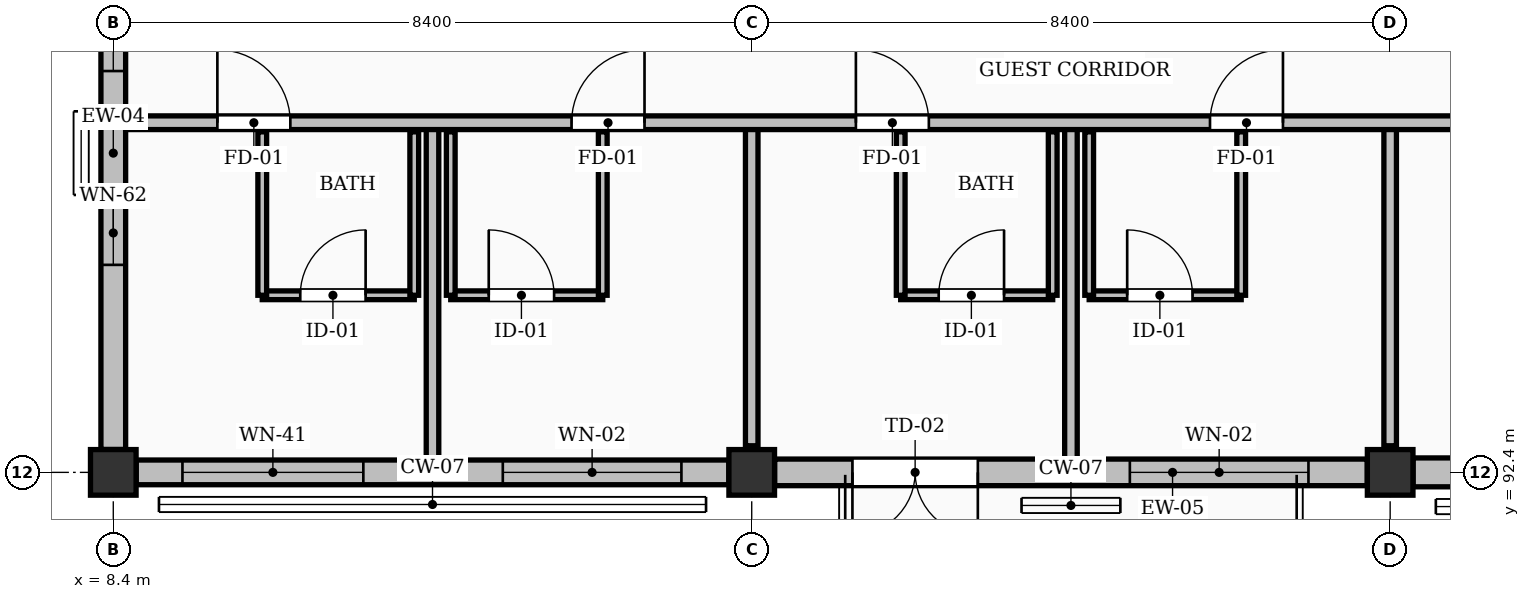
"""IFC4 building model, lengths in metres.
Left out: names, types, materials, properties, quantities, classifications, styles, units other than length and angle.
Written with IfcOpenShell. Run it as: python <this file> out.ifc"""

import sys

from ifc_helpers import new_model, si_unit, direction, frame, frame_2d, origin, origin_2d, place, context, subcontext, project, spatial, rectangle, extrude, element, fill, save


model = new_model("IFC4")
c1 = context("Model", 3, precision=1e-05, world=origin(), true_north=direction((0.0, 1.0)))
c2 = subcontext(c1, "Body", "Model", "MODEL_VIEW")
j1 = project(units=[si_unit("LENGTHUNIT", "METRE"), si_unit("PLANEANGLEUNIT", "RADIAN")], contexts=[c1])
p1 = place(None, origin())
s1 = spatial("IfcSite", under=j1, at=p1, CompositionType="ELEMENT")
p2 = place(p1, origin())
s2 = spatial("IfcBuilding", under=s1, at=p2, CompositionType="ELEMENT")
p3 = place(p2, frame((0.0, 0.0, 31.92)))
s3 = spatial("IfcBuildingStorey", under=s2, at=p3, CompositionType="ELEMENT", Elevation=31.92)
for number, where, z_axis, x_axis in (
    (1, (8.4, 92.4, 0.0), (0.0, 0.0, 1.0), (1.0, 0.0, 0.0)),
    (2, (16.8, 92.4, 0.0), (0.0, 0.0, 1.0), (1.0, 0.0, 0.0)),
    (3, (25.2, 92.4, 0.0), (0.0, 0.0, 1.0), (1.0, 0.0, 0.0)),
):
    element("IfcColumn", number, at=place(p3, frame(where, z_axis=z_axis, x_axis=x_axis)), inside=s3, PredefinedType="COLUMN", context=c2, shape_type="SweptSolid", body=[
        extrude(rectangle(XDim=0.6, YDim=0.6, at=origin_2d()), origin(), (0.0, 0.0, 1.0), 3.36),
    ])
p4 = place(p3, frame((8.701, 92.4, 0.0), z_axis=(0.0, 0.0, 1.0), x_axis=(1.0, 0.0, 0.0)))
e4 = element("IfcWall", 4, at=p4, inside=s3, PredefinedType="SOLIDWALL", context=c2, shape_type="SweptSolid", body=[
    extrude(rectangle(XDim=7.798, YDim=0.325, at=frame_2d((3.899, 0.0))), origin(), (0.0, 0.0, 1.0), 2.474),
])
p5 = place(p4, frame((0.609, 0.0, 0.25)))
e5 = element("IfcOpeningElement", 5, at=p5, cuts=e4, PredefinedType="OPENING", context=c2, shape_type="SweptSolid", body=[
    extrude(rectangle(XDim=2.38, YDim=2.0, at=frame_2d((1.19, 1.0))), frame((0.0, 0.172, 0.0), z_axis=(0.0, -1.0, 0.0), x_axis=(1.0, 0.0, 0.0)), (0.0, 0.0, 1.0), 0.345),
])
p6 = place(p4, frame((4.824, 0.0, 0.25)))
e6 = element("IfcOpeningElement", 6, at=p6, cuts=e4, PredefinedType="OPENING", context=c2, shape_type="SweptSolid", body=[
    extrude(rectangle(XDim=2.35, YDim=1.85, at=frame_2d((1.175, 0.925))), frame((0.0, 0.172, 0.0), z_axis=(0.0, -1.0, 0.0), x_axis=(1.0, 0.0, 0.0)), (0.0, 0.0, 1.0), 0.345),
])
p7 = place(p3, frame((17.101, 92.4, 0.0), z_axis=(0.0, 0.0, 1.0), x_axis=(1.0, 0.0, 0.0)))
e7 = element("IfcWall", 7, at=p7, inside=s3, PredefinedType="SOLIDWALL", context=c2, shape_type="SweptSolid", body=[
    extrude(rectangle(XDim=7.798, YDim=0.35, at=frame_2d((3.899, 0.0))), origin(), (0.0, 0.0, 1.0), 2.474),
])
p8 = place(p7, frame((1.024, 0.0, 0.0)))
e8 = element("IfcOpeningElement", 8, at=p8, cuts=e7, PredefinedType="OPENING", context=c2, shape_type="SweptSolid", body=[
    extrude(rectangle(XDim=1.65, YDim=2.08, at=frame_2d((0.825, 1.04))), frame((0.0, 0.185, 0.0), z_axis=(0.0, -1.0, 0.0), x_axis=(1.0, 0.0, 0.0)), (0.0, 0.0, 1.0), 0.37),
])
p9 = place(p7, frame((4.674, 0.0, 0.25)))
e9 = element("IfcOpeningElement", 9, at=p9, cuts=e7, PredefinedType="OPENING", context=c2, shape_type="SweptSolid", body=[
    extrude(rectangle(XDim=2.35, YDim=1.85, at=frame_2d((1.175, 0.925))), frame((0.0, 0.185, 0.0), z_axis=(0.0, -1.0, 0.0), x_axis=(1.0, 0.0, 0.0)), (0.0, 0.0, 1.0), 0.37),
])
p10 = place(p3, frame((25.501, 92.4, 0.0), z_axis=(0.0, 0.0, 1.0), x_axis=(1.0, 0.0, 0.0)))
e10 = element("IfcWall", 10, at=p10, inside=s3, PredefinedType="SOLIDWALL", context=c2, shape_type="SweptSolid", body=[
    extrude(rectangle(XDim=7.798, YDim=0.38, at=frame_2d((3.899, 0.0))), origin(), (0.0, 0.0, 1.0), 2.474),
])
p11 = place(p10, frame((0.674, 0.0, 0.25)))
e11 = element("IfcOpeningElement", 11, at=p11, cuts=e10, PredefinedType="OPENING", context=c2, shape_type="SweptSolid", body=[
    extrude(rectangle(XDim=2.25, YDim=1.95, at=frame_2d((1.125, 0.975))), frame((0.0, 0.2, 0.0), z_axis=(0.0, -1.0, 0.0), x_axis=(1.0, 0.0, 0.0)), (0.0, 0.0, 1.0), 0.4),
])
p12 = place(p10, frame((4.874, 0.0, 0.25)))
e12 = element("IfcOpeningElement", 12, at=p12, cuts=e10, PredefinedType="OPENING", context=c2, shape_type="SweptSolid", body=[
    extrude(rectangle(XDim=2.25, YDim=2.05, at=frame_2d((1.125, 1.025))), frame((0.0, 0.2, 0.0), z_axis=(0.0, -1.0, 0.0), x_axis=(1.0, 0.0, 0.0)), (0.0, 0.0, 1.0), 0.4),
])
p13 = place(p3, frame((8.4, 92.701, 0.0), z_axis=(0.0, 0.0, 1.0), x_axis=(0.0, 1.0, 0.0)))
e13 = element("IfcWall", 13, at=p13, inside=s3, PredefinedType="SOLIDWALL", context=c2, shape_type="SweptSolid", body=[
    extrude(rectangle(XDim=7.798, YDim=0.325, at=frame_2d((3.899, 0.0))), origin(), (0.0, 0.0, 1.0), 2.474),
])
p14 = place(p13, frame((2.429, 0.0, 0.3)))
e14 = element("IfcOpeningElement", 14, at=p14, cuts=e13, PredefinedType="OPENING", context=c2, shape_type="SweptSolid", body=[
    extrude(rectangle(XDim=0.84, YDim=1.75, at=frame_2d((0.42, 0.875))), frame((0.0, 0.172, 0.0), z_axis=(0.0, -1.0, 0.0), x_axis=(1.0, 0.0, 0.0)), (0.0, 0.0, 1.0), 0.345),
])
p15 = place(p13, frame((4.979, 0.0, 0.3)))
e15 = element("IfcOpeningElement", 15, at=p15, cuts=e13, PredefinedType="OPENING", context=c2, shape_type="SweptSolid", body=[
    extrude(rectangle(XDim=0.84, YDim=1.75, at=frame_2d((0.42, 0.875))), frame((0.0, 0.172, 0.0), z_axis=(0.0, -1.0, 0.0), x_axis=(1.0, 0.0, 0.0)), (0.0, 0.0, 1.0), 0.345),
])
p16 = place(p3, frame((10.36, 94.73, 0.0), z_axis=(0.0, 0.0, 1.0), x_axis=(1.0, 0.0, 0.0)))
e16 = element("IfcWall", 16, at=p16, inside=s3, PredefinedType="PARTITIONING", context=c2, shape_type="SweptSolid", body=[
    extrude(rectangle(XDim=2.0, YDim=0.115, at=frame_2d((1.0, 0.0))), origin(), (0.0, 0.0, 1.0), 3.1),
])
p17 = place(p16, frame((0.5, 0.0, 0.0)))
e17 = element("IfcOpeningElement", 17, at=p17, cuts=e16, PredefinedType="OPENING", context=c2, shape_type="SweptSolid", body=[
    extrude(rectangle(XDim=0.86, YDim=2.05, at=frame_2d((0.43, 1.025))), frame((0.0, 0.067, 0.0), z_axis=(0.0, -1.0, 0.0), x_axis=(1.0, 0.0, 0.0)), (0.0, 0.0, 1.0), 0.135),
])
p18 = place(p3, frame((10.36, 94.73, 0.0), z_axis=(0.0, 0.0, 1.0), x_axis=(0.0, 1.0, 0.0)))
e18 = element("IfcWall", 18, at=p18, inside=s3, PredefinedType="PARTITIONING", context=c2, shape_type="SweptSolid", body=[
    extrude(rectangle(XDim=2.15, YDim=0.115, at=frame_2d((1.075, 0.0))), origin(), (0.0, 0.0, 1.0), 2.622),
])
p19 = place(p3, frame((12.36, 94.73, 0.0), z_axis=(0.0, 0.0, 1.0), x_axis=(0.0, 1.0, 0.0)))
e19 = element("IfcWall", 19, at=p19, inside=s3, PredefinedType="PARTITIONING", context=c2, shape_type="SweptSolid", body=[
    extrude(rectangle(XDim=2.15, YDim=0.115, at=frame_2d((1.075, 0.0))), origin(), (0.0, 0.0, 1.0), 3.1),
])
p20 = place(p3, frame((12.84, 94.73, 0.0), z_axis=(0.0, 0.0, 1.0), x_axis=(1.0, 0.0, 0.0)))
e20 = element("IfcWall", 20, at=p20, inside=s3, PredefinedType="PARTITIONING", context=c2, shape_type="SweptSolid", body=[
    extrude(rectangle(XDim=2.0, YDim=0.115, at=frame_2d((1.0, 0.0))), origin(), (0.0, 0.0, 1.0), 3.1),
])
p21 = place(p20, frame((0.5, 0.0, 0.0)))
e21 = element("IfcOpeningElement", 21, at=p21, cuts=e20, PredefinedType="OPENING", context=c2, shape_type="SweptSolid", body=[
    extrude(rectangle(XDim=0.86, YDim=2.05, at=frame_2d((0.43, 1.025))), frame((0.0, 0.067, 0.0), z_axis=(0.0, -1.0, 0.0), x_axis=(1.0, 0.0, 0.0)), (0.0, 0.0, 1.0), 0.135),
])
p22 = place(p3, frame((12.84, 94.73, 0.0), z_axis=(0.0, 0.0, 1.0), x_axis=(0.0, 1.0, 0.0)))
e22 = element("IfcWall", 22, at=p22, inside=s3, PredefinedType="PARTITIONING", context=c2, shape_type="SweptSolid", body=[
    extrude(rectangle(XDim=2.15, YDim=0.115, at=frame_2d((1.075, 0.0))), origin(), (0.0, 0.0, 1.0), 3.1),
])
p23 = place(p3, frame((14.84, 94.73, 0.0), z_axis=(0.0, 0.0, 1.0), x_axis=(0.0, 1.0, 0.0)))
e23 = element("IfcWall", 23, at=p23, inside=s3, PredefinedType="PARTITIONING", context=c2, shape_type="SweptSolid", body=[
    extrude(rectangle(XDim=2.15, YDim=0.115, at=frame_2d((1.075, 0.0))), origin(), (0.0, 0.0, 1.0), 2.622),
])
p24 = place(p3, frame((12.6, 92.562, 0.0), z_axis=(0.0, 0.0, 1.0), x_axis=(0.0, 1.0, 0.0)))
e24 = element("IfcWall", 24, at=p24, inside=s3, PredefinedType="PARTITIONING", context=c2, shape_type="SweptSolid", body=[
    extrude(rectangle(XDim=4.438, YDim=0.165, at=frame_2d((2.219, 0.0))), origin(), (0.0, 0.0, 1.0), 3.1),
])
p25 = place(p3, frame((18.76, 94.73, 0.0), z_axis=(0.0, 0.0, 1.0), x_axis=(1.0, 0.0, 0.0)))
e25 = element("IfcWall", 25, at=p25, inside=s3, PredefinedType="PARTITIONING", context=c2, shape_type="SweptSolid", body=[
    extrude(rectangle(XDim=2.0, YDim=0.115, at=frame_2d((1.0, 0.0))), origin(), (0.0, 0.0, 1.0), 3.1),
])
p26 = place(p25, frame((0.5, 0.0, 0.0)))
e26 = element("IfcOpeningElement", 26, at=p26, cuts=e25, PredefinedType="OPENING", context=c2, shape_type="SweptSolid", body=[
    extrude(rectangle(XDim=0.86, YDim=2.05, at=frame_2d((0.43, 1.025))), frame((0.0, 0.067, 0.0), z_axis=(0.0, -1.0, 0.0), x_axis=(1.0, 0.0, 0.0)), (0.0, 0.0, 1.0), 0.135),
])
for number, where, z_axis, x_axis in (
    (27, (18.76, 94.73, 0.0), (0.0, 0.0, 1.0), (0.0, 1.0, 0.0)),
    (28, (20.76, 94.73, 0.0), (0.0, 0.0, 1.0), (0.0, 1.0, 0.0)),
):
    element("IfcWall", number, at=place(p3, frame(where, z_axis=z_axis, x_axis=x_axis)), inside=s3, PredefinedType="PARTITIONING", context=c2, shape_type="SweptSolid", body=[
        extrude(rectangle(XDim=2.15, YDim=0.115, at=frame_2d((1.075, 0.0))), origin(), (0.0, 0.0, 1.0), 3.1),
    ])
p27 = place(p3, frame((21.24, 94.73, 0.0), z_axis=(0.0, 0.0, 1.0), x_axis=(1.0, 0.0, 0.0)))
e29 = element("IfcWall", 29, at=p27, inside=s3, PredefinedType="PARTITIONING", context=c2, shape_type="SweptSolid", body=[
    extrude(rectangle(XDim=2.0, YDim=0.115, at=frame_2d((1.0, 0.0))), origin(), (0.0, 0.0, 1.0), 3.1),
])
p28 = place(p27, frame((0.5, 0.0, 0.0)))
e30 = element("IfcOpeningElement", 30, at=p28, cuts=e29, PredefinedType="OPENING", context=c2, shape_type="SweptSolid", body=[
    extrude(rectangle(XDim=0.86, YDim=2.05, at=frame_2d((0.43, 1.025))), frame((0.0, 0.067, 0.0), z_axis=(0.0, -1.0, 0.0), x_axis=(1.0, 0.0, 0.0)), (0.0, 0.0, 1.0), 0.135),
])
for number, where, z_axis, x_axis in (
    (31, (21.24, 94.73, 0.0), (0.0, 0.0, 1.0), (0.0, 1.0, 0.0)),
    (32, (23.24, 94.73, 0.0), (0.0, 0.0, 1.0), (0.0, 1.0, 0.0)),
):
    element("IfcWall", number, at=place(p3, frame(where, z_axis=z_axis, x_axis=x_axis)), inside=s3, PredefinedType="PARTITIONING", context=c2, shape_type="SweptSolid", body=[
        extrude(rectangle(XDim=2.15, YDim=0.115, at=frame_2d((1.075, 0.0))), origin(), (0.0, 0.0, 1.0), 3.1),
    ])
p29 = place(p3, frame((21.0, 92.575, 0.0), z_axis=(0.0, 0.0, 1.0), x_axis=(0.0, 1.0, 0.0)))
e33 = element("IfcWall", 33, at=p29, inside=s3, PredefinedType="PARTITIONING", context=c2, shape_type="SweptSolid", body=[
    extrude(rectangle(XDim=4.425, YDim=0.165, at=frame_2d((2.212, 0.0))), origin(), (0.0, 0.0, 1.0), 3.1),
])
for number, where, z_axis, x_axis in (
    (34, (16.8, 92.75, 0.0), (0.0, 0.0, 1.0), (0.0, 1.0, 0.0)),
    (35, (25.2, 92.75, 0.0), (0.0, 0.0, 1.0), (0.0, 1.0, 0.0)),
):
    element("IfcWall", number, at=place(p3, frame(where, z_axis=z_axis, x_axis=x_axis)), inside=s3, PredefinedType="PARTITIONING", context=c2, shape_type="SweptSolid", body=[
        extrude(rectangle(XDim=4.25, YDim=0.165, at=frame_2d((2.125, 0.0))), origin(), (0.0, 0.0, 1.0), 2.435),
    ])
p30 = place(p3, frame((8.562, 97.0, 0.0), z_axis=(0.0, 0.0, 1.0), x_axis=(1.0, 0.0, 0.0)))
e36 = element("IfcWall", 36, at=p30, inside=s3, PredefinedType="PARTITIONING", context=c2, shape_type="SweptSolid", body=[
    extrude(rectangle(XDim=41.837, YDim=0.18, at=frame_2d((20.919, 0.0))), origin(), (0.0, 0.0, 1.0), 3.1),
])
p31 = place(p30, frame((1.207, 0.0, 0.0)))
e37 = element("IfcOpeningElement", 37, at=p31, cuts=e36, PredefinedType="OPENING", context=c2, shape_type="SweptSolid", body=[
    extrude(rectangle(XDim=0.96, YDim=2.15, at=frame_2d((0.48, 1.075))), frame((0.0, 0.1, 0.0), z_axis=(0.0, -1.0, 0.0), x_axis=(1.0, 0.0, 0.0)), (0.0, 0.0, 1.0), 0.2),
])
p32 = place(p30, frame((5.867, 0.0, 0.0)))
e38 = element("IfcOpeningElement", 38, at=p32, cuts=e36, PredefinedType="OPENING", context=c2, shape_type="SweptSolid", body=[
    extrude(rectangle(XDim=0.96, YDim=2.15, at=frame_2d((0.48, 1.075))), frame((0.0, 0.1, 0.0), z_axis=(0.0, -1.0, 0.0), x_axis=(1.0, 0.0, 0.0)), (0.0, 0.0, 1.0), 0.2),
])
p33 = place(p30, frame((9.608, 0.0, 0.0)))
e39 = element("IfcOpeningElement", 39, at=p33, cuts=e36, PredefinedType="OPENING", context=c2, shape_type="SweptSolid", body=[
    extrude(rectangle(XDim=0.96, YDim=2.15, at=frame_2d((0.48, 1.075))), frame((0.0, 0.1, 0.0), z_axis=(0.0, -1.0, 0.0), x_axis=(1.0, 0.0, 0.0)), (0.0, 0.0, 1.0), 0.2),
])
p34 = place(p30, frame((14.267, 0.0, 0.0)))
e40 = element("IfcOpeningElement", 40, at=p34, cuts=e36, PredefinedType="OPENING", context=c2, shape_type="SweptSolid", body=[
    extrude(rectangle(XDim=0.96, YDim=2.15, at=frame_2d((0.48, 1.075))), frame((0.0, 0.1, 0.0), z_axis=(0.0, -1.0, 0.0), x_axis=(1.0, 0.0, 0.0)), (0.0, 0.0, 1.0), 0.2),
])
p35 = place(p30, frame((18.008, 0.0, 0.0)))
e41 = element("IfcOpeningElement", 41, at=p35, cuts=e36, PredefinedType="OPENING", context=c2, shape_type="SweptSolid", body=[
    extrude(rectangle(XDim=0.96, YDim=2.15, at=frame_2d((0.48, 1.075))), frame((0.0, 0.1, 0.0), z_axis=(0.0, -1.0, 0.0), x_axis=(1.0, 0.0, 0.0)), (0.0, 0.0, 1.0), 0.2),
])
p36 = place(p30, frame((22.668, 0.0, 0.0)))
e42 = element("IfcOpeningElement", 42, at=p36, cuts=e36, PredefinedType="OPENING", context=c2, shape_type="SweptSolid", body=[
    extrude(rectangle(XDim=0.96, YDim=2.15, at=frame_2d((0.48, 1.075))), frame((0.0, 0.1, 0.0), z_axis=(0.0, -1.0, 0.0), x_axis=(1.0, 0.0, 0.0)), (0.0, 0.0, 1.0), 0.2),
])
p37 = place(p30, frame((26.407, 0.0, 0.0)))
e43 = element("IfcOpeningElement", 43, at=p37, cuts=e36, PredefinedType="OPENING", context=c2, shape_type="SweptSolid", body=[
    extrude(rectangle(XDim=0.96, YDim=2.15, at=frame_2d((0.48, 1.075))), frame((0.0, 0.1, 0.0), z_axis=(0.0, -1.0, 0.0), x_axis=(1.0, 0.0, 0.0)), (0.0, 0.0, 1.0), 0.2),
])
p38 = place(p30, frame((31.068, 0.0, 0.0)))
e44 = element("IfcOpeningElement", 44, at=p38, cuts=e36, PredefinedType="OPENING", context=c2, shape_type="SweptSolid", body=[
    extrude(rectangle(XDim=0.96, YDim=2.15, at=frame_2d((0.48, 1.075))), frame((0.0, 0.1, 0.0), z_axis=(0.0, -1.0, 0.0), x_axis=(1.0, 0.0, 0.0)), (0.0, 0.0, 1.0), 0.2),
])
p39 = place(p30, frame((36.837, 0.0, 0.0)))
e45 = element("IfcOpeningElement", 45, at=p39, cuts=e36, PredefinedType="OPENING", context=c2, shape_type="SweptSolid", body=[
    extrude(rectangle(XDim=1.62, YDim=2.2, at=frame_2d((0.81, 1.1))), frame((0.0, 0.1, 0.0), z_axis=(0.0, -1.0, 0.0), x_axis=(1.0, 0.0, 0.0)), (0.0, 0.0, 1.0), 0.2),
])
p40 = place(p5, origin())
e46 = element("IfcWindow", 46, at=p40, inside=s3, PartitioningType="DOUBLE_PANEL_VERTICAL", PredefinedType="WINDOW", context=c2, shape_type="SweptSolid", body=[
    extrude(rectangle(XDim=2.38, YDim=2.0, at=frame_2d((1.19, 1.0))), frame((0.0, 0.03, 0.0), z_axis=(0.0, -1.0, 0.0), x_axis=(1.0, 0.0, 0.0)), (0.0, 0.0, 1.0), 0.06),
])
fill(e5, e46)
p41 = place(p6, origin())
e47 = element("IfcWindow", 47, at=p41, inside=s3, PartitioningType="DOUBLE_PANEL_VERTICAL", PredefinedType="WINDOW", context=c2, shape_type="SweptSolid", body=[
    extrude(rectangle(XDim=2.35, YDim=1.85, at=frame_2d((1.175, 0.925))), frame((0.0, 0.03, 0.0), z_axis=(0.0, -1.0, 0.0), x_axis=(1.0, 0.0, 0.0)), (0.0, 0.0, 1.0), 0.06),
])
fill(e6, e47)
p42 = place(p8, frame((1.65, 0.0, 0.0), z_axis=(0.0, 0.0, 1.0), x_axis=(-1.0, 0.0, 0.0)))
e48 = element("IfcDoor", 48, at=p42, inside=s3, OperationType="DOUBLE_DOOR_SINGLE_SWING", PredefinedType="DOOR", context=c2, shape_type="SweptSolid", body=[
    extrude(rectangle(XDim=1.65, YDim=2.08, at=frame_2d((0.825, 1.04))), frame((0.0, 0.025, 0.0), z_axis=(0.0, -1.0, 0.0), x_axis=(1.0, 0.0, 0.0)), (0.0, 0.0, 1.0), 0.05),
])
fill(e8, e48)
p43 = place(p9, origin())
e49 = element("IfcWindow", 49, at=p43, inside=s3, PartitioningType="DOUBLE_PANEL_VERTICAL", PredefinedType="WINDOW", context=c2, shape_type="SweptSolid", body=[
    extrude(rectangle(XDim=2.35, YDim=1.85, at=frame_2d((1.175, 0.925))), frame((0.0, 0.03, 0.0), z_axis=(0.0, -1.0, 0.0), x_axis=(1.0, 0.0, 0.0)), (0.0, 0.0, 1.0), 0.06),
])
fill(e9, e49)
p44 = place(p14, origin())
e50 = element("IfcWindow", 50, at=p44, inside=s3, PartitioningType="SINGLE_PANEL", PredefinedType="WINDOW", context=c2, shape_type="SweptSolid", body=[
    extrude(rectangle(XDim=0.84, YDim=1.75, at=frame_2d((0.42, 0.875))), frame((0.0, 0.03, 0.0), z_axis=(0.0, -1.0, 0.0), x_axis=(1.0, 0.0, 0.0)), (0.0, 0.0, 1.0), 0.06),
])
fill(e14, e50)
p45 = place(p15, origin())
e51 = element("IfcWindow", 51, at=p45, inside=s3, PartitioningType="SINGLE_PANEL", PredefinedType="WINDOW", context=c2, shape_type="SweptSolid", body=[
    extrude(rectangle(XDim=0.84, YDim=1.75, at=frame_2d((0.42, 0.875))), frame((0.0, 0.03, 0.0), z_axis=(0.0, -1.0, 0.0), x_axis=(1.0, 0.0, 0.0)), (0.0, 0.0, 1.0), 0.06),
])
fill(e15, e51)
p46 = place(p17, origin())
e52 = element("IfcDoor", 52, at=p46, inside=s3, OperationType="SINGLE_SWING_RIGHT", PredefinedType="DOOR", context=c2, shape_type="SweptSolid", body=[
    extrude(rectangle(XDim=0.86, YDim=2.05, at=frame_2d((0.43, 1.025))), frame((0.0, 0.025, 0.0), z_axis=(0.0, -1.0, 0.0), x_axis=(1.0, 0.0, 0.0)), (0.0, 0.0, 1.0), 0.05),
])
fill(e17, e52)
p47 = place(p21, origin())
e53 = element("IfcDoor", 53, at=p47, inside=s3, OperationType="SINGLE_SWING_LEFT", PredefinedType="DOOR", context=c2, shape_type="SweptSolid", body=[
    extrude(rectangle(XDim=0.86, YDim=2.05, at=frame_2d((0.43, 1.025))), frame((0.0, 0.025, 0.0), z_axis=(0.0, -1.0, 0.0), x_axis=(1.0, 0.0, 0.0)), (0.0, 0.0, 1.0), 0.05),
])
fill(e21, e53)
p48 = place(p26, origin())
e54 = element("IfcDoor", 54, at=p48, inside=s3, OperationType="SINGLE_SWING_RIGHT", PredefinedType="DOOR", context=c2, shape_type="SweptSolid", body=[
    extrude(rectangle(XDim=0.86, YDim=2.05, at=frame_2d((0.43, 1.025))), frame((0.0, 0.025, 0.0), z_axis=(0.0, -1.0, 0.0), x_axis=(1.0, 0.0, 0.0)), (0.0, 0.0, 1.0), 0.05),
])
fill(e26, e54)
p49 = place(p28, origin())
e55 = element("IfcDoor", 55, at=p49, inside=s3, OperationType="SINGLE_SWING_LEFT", PredefinedType="DOOR", context=c2, shape_type="SweptSolid", body=[
    extrude(rectangle(XDim=0.86, YDim=2.05, at=frame_2d((0.43, 1.025))), frame((0.0, 0.025, 0.0), z_axis=(0.0, -1.0, 0.0), x_axis=(1.0, 0.0, 0.0)), (0.0, 0.0, 1.0), 0.05),
])
fill(e30, e55)
p50 = place(p31, origin())
e56 = element("IfcDoor", 56, at=p50, inside=s3, OperationType="SINGLE_SWING_LEFT", PredefinedType="DOOR", context=c2, shape_type="SweptSolid", body=[
    extrude(rectangle(XDim=0.96, YDim=2.15, at=frame_2d((0.48, 1.075))), frame((0.0, 0.025, 0.0), z_axis=(0.0, -1.0, 0.0), x_axis=(1.0, 0.0, 0.0)), (0.0, 0.0, 1.0), 0.05),
])
fill(e37, e56)
p51 = place(p32, origin())
e57 = element("IfcDoor", 57, at=p51, inside=s3, OperationType="SINGLE_SWING_RIGHT", PredefinedType="DOOR", context=c2, shape_type="SweptSolid", body=[
    extrude(rectangle(XDim=0.96, YDim=2.15, at=frame_2d((0.48, 1.075))), frame((0.0, 0.025, 0.0), z_axis=(0.0, -1.0, 0.0), x_axis=(1.0, 0.0, 0.0)), (0.0, 0.0, 1.0), 0.05),
])
fill(e38, e57)
p52 = place(p33, origin())
e58 = element("IfcDoor", 58, at=p52, inside=s3, OperationType="SINGLE_SWING_LEFT", PredefinedType="DOOR", context=c2, shape_type="SweptSolid", body=[
    extrude(rectangle(XDim=0.96, YDim=2.15, at=frame_2d((0.48, 1.075))), frame((0.0, 0.025, 0.0), z_axis=(0.0, -1.0, 0.0), x_axis=(1.0, 0.0, 0.0)), (0.0, 0.0, 1.0), 0.05),
])
fill(e39, e58)
p53 = place(p34, origin())
e59 = element("IfcDoor", 59, at=p53, inside=s3, OperationType="SINGLE_SWING_RIGHT", PredefinedType="DOOR", context=c2, shape_type="SweptSolid", body=[
    extrude(rectangle(XDim=0.96, YDim=2.15, at=frame_2d((0.48, 1.075))), frame((0.0, 0.025, 0.0), z_axis=(0.0, -1.0, 0.0), x_axis=(1.0, 0.0, 0.0)), (0.0, 0.0, 1.0), 0.05),
])
fill(e40, e59)
save(model, sys.argv[1])
